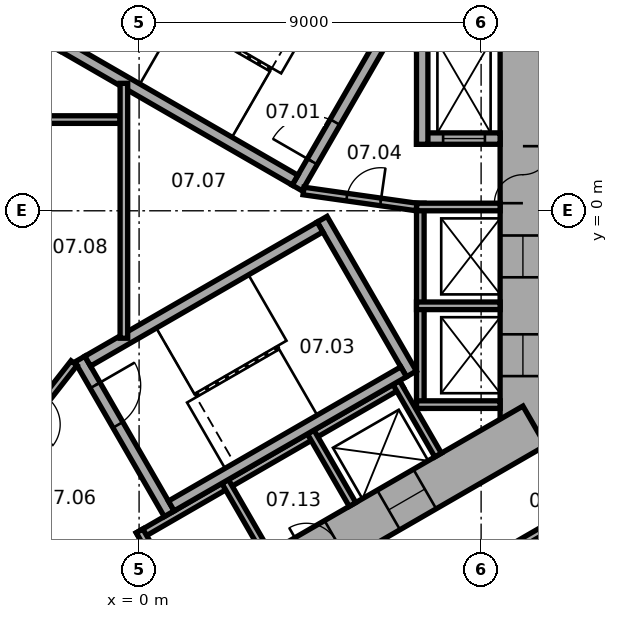
"""IFC4 building model, lengths in metres.
Left out: names, types, materials, properties, quantities, classifications, styles, units other than length and angle.
Written with IfcOpenShell. Run it as: python <this file> out.ifc"""

import sys

from ifc_helpers import new_model, si_unit, direction, frame, frame_2d, origin, place, context, subcontext, project, spatial, rectangle, extrude, element, fill, save


model = new_model("IFC4")
c1 = context("Model", 3, precision=1e-05, world=origin(), true_north=direction((0.0, 1.0)))
c2 = subcontext(c1, "Body", "Model", "MODEL_VIEW")
j1 = project(units=[si_unit("LENGTHUNIT", "METRE"), si_unit("PLANEANGLEUNIT", "RADIAN")], contexts=[c1])
p1 = place(None, origin())
s1 = spatial("IfcSite", under=j1, at=p1, CompositionType="ELEMENT")
p2 = place(p1, origin())
s2 = spatial("IfcBuilding", under=s1, at=p2, CompositionType="ELEMENT")
p3 = place(p2, frame((0.0, 0.0, 44.0)))
s3 = spatial("IfcBuildingStorey", under=s2, at=p3, CompositionType="ELEMENT", Elevation=44.0)
p4 = place(p3, frame((10.1, -6.177, 0.0), z_axis=(0.0, 0.0, 1.0), x_axis=(0.0, 1.0, 0.0)))
e1 = element("IfcWall", 1, at=p4, inside=s3, PredefinedType="SHEAR", context=c2, shape_type="SweptSolid", body=[
    extrude(rectangle(XDim=12.355, YDim=1.2, at=frame_2d((6.177, 0.0))), origin(), (0.0, 0.0, 1.0), 3.3),
])
p5 = place(p4, frame((6.378, 0.0, 0.0)))
e2 = element("IfcOpeningElement", 2, at=p5, cuts=e1, PredefinedType="OPENING", context=c2, shape_type="SweptSolid", body=[
    extrude(rectangle(XDim=1.5, YDim=2.1, at=frame_2d((0.75, 1.05))), frame((0.0, 0.61, 0.0), z_axis=(0.0, -1.0, 0.0), x_axis=(1.0, 0.0, 0.0)), (0.0, 0.0, 1.0), 1.22),
])
p6 = place(p4, frame((1.828, 0.0, 0.0)))
e3 = element("IfcOpeningElement", 3, at=p6, cuts=e1, PredefinedType="OPENING", context=c2, shape_type="SweptSolid", body=[
    extrude(rectangle(XDim=1.1, YDim=2.1, at=frame_2d((0.55, 1.05))), frame((0.0, 0.61, 0.0), z_axis=(0.0, -1.0, 0.0), x_axis=(1.0, 0.0, 0.0)), (0.0, 0.0, 1.0), 1.22),
])
p7 = place(p4, frame((4.427, 0.0, 0.0)))
e4 = element("IfcOpeningElement", 4, at=p7, cuts=e1, PredefinedType="OPENING", context=c2, shape_type="SweptSolid", body=[
    extrude(rectangle(XDim=1.1, YDim=2.1, at=frame_2d((0.55, 1.05))), frame((0.0, 0.61, 0.0), z_axis=(0.0, -1.0, 0.0), x_axis=(1.0, 0.0, 0.0)), (0.0, 0.0, 1.0), 1.22),
])
p8 = place(p3, frame((-10.4, -5.658, 0.0), z_axis=(0.0, 0.0, 1.0), x_axis=(0.866021384402, -0.500006961711, 0.0)))
e5 = element("IfcWall", 5, at=p8, inside=s3, PredefinedType="SHEAR", context=c2, shape_type="SweptSolid", body=[
    extrude(rectangle(XDim=12.355, YDim=1.2, at=frame_2d((6.178, 0.0))), origin(), (0.0, 0.0, 1.0), 3.3),
])
p9 = place(p8, frame((6.378, 0.0, 0.0)))
e6 = element("IfcOpeningElement", 6, at=p9, cuts=e5, PredefinedType="OPENING", context=c2, shape_type="SweptSolid", body=[
    extrude(rectangle(XDim=1.5, YDim=2.1, at=frame_2d((0.75, 1.05))), frame((0.0, 0.61, 0.0), z_axis=(0.0, -1.0, 0.0), x_axis=(1.0, 0.0, 0.0)), (0.0, 0.0, 1.0), 1.22),
])
p10 = place(p8, frame((3.228, 0.0, 0.0)))
e7 = element("IfcOpeningElement", 7, at=p10, cuts=e5, PredefinedType="OPENING", context=c2, shape_type="SweptSolid", body=[
    extrude(rectangle(XDim=0.9, YDim=2.1, at=frame_2d((0.45, 1.05))), frame((0.0, 0.61, 0.0), z_axis=(0.0, -1.0, 0.0), x_axis=(1.0, 0.0, 0.0)), (0.0, 0.0, 1.0), 1.22),
])
p11 = place(p3, frame((-0.3, -11.836, 0.0), z_axis=(0.0, 0.0, 1.0), x_axis=(0.866021384402, 0.500006961711, 0.0)))
e8 = element("IfcWall", 8, at=p11, inside=s3, PredefinedType="SHEAR", context=c2, shape_type="SweptSolid", body=[
    extrude(rectangle(XDim=12.355, YDim=1.2, at=frame_2d((6.178, 0.0))), origin(), (0.0, 0.0, 1.0), 3.3),
])
p12 = place(p11, frame((2.828, 0.0, 0.0)))
e9 = element("IfcOpeningElement", 9, at=p12, cuts=e8, PredefinedType="OPENING", context=c2, shape_type="SweptSolid", body=[
    extrude(rectangle(XDim=0.9, YDim=2.1, at=frame_2d((0.45, 1.05))), frame((0.0, 0.61, 0.0), z_axis=(0.0, -1.0, 0.0), x_axis=(1.0, 0.0, 0.0)), (0.0, 0.0, 1.0), 1.22),
])
p13 = place(p11, frame((5.428, 0.0, 0.0)))
e10 = element("IfcOpeningElement", 10, at=p13, cuts=e8, PredefinedType="OPENING", context=c2, shape_type="SweptSolid", body=[
    extrude(rectangle(XDim=0.9, YDim=2.1, at=frame_2d((0.45, 1.05))), frame((0.0, 0.61, 0.0), z_axis=(0.0, -1.0, 0.0), x_axis=(1.0, 0.0, 0.0)), (0.0, 0.0, 1.0), 1.22),
])
p14 = place(p11, frame((7.928, 0.0, 0.0)))
e11 = element("IfcOpeningElement", 11, at=p14, cuts=e8, PredefinedType="OPENING", context=c2, shape_type="SweptSolid", body=[
    extrude(rectangle(XDim=1.1, YDim=2.1, at=frame_2d((0.55, 1.05))), frame((0.0, 0.61, 0.0), z_axis=(0.0, -1.0, 0.0), x_axis=(1.0, 0.0, 0.0)), (0.0, 0.0, 1.0), 1.22),
])
p15 = place(p3, frame((7.4, -5.2, 0.0), z_axis=(0.0, 0.0, 1.0), x_axis=(0.0, 1.0, 0.0)))
e12 = element("IfcWall", 12, at=p15, inside=s3, PredefinedType="PARTITIONING", context=c2, shape_type="SweptSolid", body=[
    extrude(rectangle(XDim=5.4, YDim=0.2, at=frame_2d((2.7, 0.0))), origin(), (0.0, 0.0, 1.0), 3.05),
])
for number, where, z_axis, x_axis in (
    (13, (7.3, -5.1, 0.0), (0.0, 0.0, 1.0), (1.0, 0.0, 0.0)),
    (14, (7.3, -2.5, 0.0), (0.0, 0.0, 1.0), (1.0, 0.0, 0.0)),
    (15, (7.3, 0.1, 0.0), (0.0, 0.0, 1.0), (1.0, 0.0, 0.0)),
):
    element("IfcWall", number, at=place(p3, frame(where, z_axis=z_axis, x_axis=x_axis)), inside=s3, PredefinedType="PARTITIONING", context=c2, shape_type="SweptSolid", body=[
        extrude(rectangle(XDim=2.2, YDim=0.2, at=frame_2d((1.1, 0.0))), origin(), (0.0, 0.0, 1.0), 3.05),
    ])
p16 = place(p3, frame((7.424, 4.259, 0.0), z_axis=(0.0, 0.0, 1.0), x_axis=(-0.866026010844, 0.49999894854, 0.0)))
e16 = element("IfcWall", 16, at=p16, inside=s3, PredefinedType="PARTITIONING", context=c2, shape_type="SweptSolid", body=[
    extrude(rectangle(XDim=8.0, YDim=0.2, at=frame_2d((4.0, 0.0))), origin(), (0.0, 0.0, 1.0), 3.05),
])
p17 = place(p3, frame((7.287, 4.222, 0.0), z_axis=(0.0, 0.0, 1.0), x_axis=(0.499946605688, 0.86605622881, 0.0)))
e17 = element("IfcWall", 17, at=p17, inside=s3, PredefinedType="PARTITIONING", context=c2, shape_type="SweptSolid", body=[
    extrude(rectangle(XDim=2.2, YDim=0.2, at=frame_2d((1.1, 0.0))), origin(), (0.0, 0.0, 1.0), 3.05),
])
p18 = place(p3, frame((-0.024, -8.559, 0.0), z_axis=(0.0, 0.0, 1.0), x_axis=(0.866026010844, 0.49999894854, 0.0)))
e18 = element("IfcWall", 18, at=p18, inside=s3, PredefinedType="PARTITIONING", context=c2, shape_type="SweptSolid", body=[
    extrude(rectangle(XDim=8.0, YDim=0.2, at=frame_2d((4.0, 0.0))), origin(), (0.0, 0.0, 1.0), 3.05),
])
for number, where, z_axis, x_axis in (
    (19, (0.013, -8.422, 0.0), (0.0, 0.0, 1.0), (0.5, -0.866, 0.0)),
    (20, (2.264, -7.122, 0.0), (0.0, 0.0, 1.0), (0.5, -0.866, 0.0)),
    (21, (4.516, -5.822, 0.0), (0.0, 0.0, 1.0), (0.5, -0.866, 0.0)),
    (22, (6.768, -4.522, 0.0), (0.0, 0.0, 1.0), (0.5, -0.866, 0.0)),
):
    element("IfcWall", number, at=place(p3, frame(where, z_axis=z_axis, x_axis=x_axis)), inside=s3, PredefinedType="PARTITIONING", context=c2, shape_type="SweptSolid", body=[
        extrude(rectangle(XDim=2.2, YDim=0.2, at=frame_2d((1.1, 0.0))), origin(), (0.0, 0.0, 1.0), 3.05),
    ])
p19 = place(p3, frame((4.158, 0.602, 0.0), z_axis=(0.0, 0.0, 1.0), x_axis=(0.499977259774, 0.866038532462, 0.0)))
e23 = element("IfcWall", 23, at=p19, inside=s3, PredefinedType="SHEAR", context=c2, shape_type="SweptSolid", body=[
    extrude(rectangle(XDim=4.7, YDim=0.3, at=frame_2d((2.35, 0.0))), origin(), (0.0, 0.0, 1.0), 3.05),
])
p20 = place(p19, frame((0.8, 0.0, 0.0)))
e24 = element("IfcOpeningElement", 24, at=p20, cuts=e23, PredefinedType="OPENING", context=c2, shape_type="SweptSolid", body=[
    extrude(rectangle(XDim=1.2, YDim=2.1, at=frame_2d((0.6, 1.05))), frame((0.0, 0.16, 0.0), z_axis=(0.0, -1.0, 0.0), x_axis=(1.0, 0.0, 0.0)), (0.0, 0.0, 1.0), 0.32),
])
p21 = place(p3, frame((4.103, 0.807, 0.0), z_axis=(0.0, 0.0, 1.0), x_axis=(-0.866027801685, 0.499995846692, 0.0)))
e25 = element("IfcWall", 25, at=p21, inside=s3, PredefinedType="SHEAR", context=c2, shape_type="SweptSolid", body=[
    extrude(rectangle(XDim=7.06, YDim=0.3, at=frame_2d((3.53, 0.0))), origin(), (0.0, 0.0, 1.0), 3.05),
])
p22 = place(p3, frame((-1.558, -3.902, 0.0), z_axis=(0.0, 0.0, 1.0), x_axis=(0.499977259774, -0.866038532462, 0.0)))
e26 = element("IfcWall", 26, at=p22, inside=s3, PredefinedType="SHEAR", context=c2, shape_type="SweptSolid", body=[
    extrude(rectangle(XDim=4.7, YDim=0.3, at=frame_2d((2.35, 0.0))), origin(), (0.0, 0.0, 1.0), 3.05),
])
p23 = place(p22, frame((0.8, 0.0, 0.0)))
e27 = element("IfcOpeningElement", 27, at=p23, cuts=e26, PredefinedType="OPENING", context=c2, shape_type="SweptSolid", body=[
    extrude(rectangle(XDim=1.2, YDim=2.1, at=frame_2d((0.6, 1.05))), frame((0.0, 0.16, 0.0), z_axis=(0.0, -1.0, 0.0), x_axis=(1.0, 0.0, 0.0)), (0.0, 0.0, 1.0), 0.32),
])
p24 = place(p3, frame((4.816, -0.222, 0.0), z_axis=(0.0, 0.0, 1.0), x_axis=(0.499977259774, -0.866038532462, 0.0)))
e28 = element("IfcWall", 28, at=p24, inside=s3, PredefinedType="SHEAR", context=c2, shape_type="SweptSolid", body=[
    extrude(rectangle(XDim=4.7, YDim=0.3, at=frame_2d((2.35, 0.0))), origin(), (0.0, 0.0, 1.0), 3.05),
])
for number, where, z_axis, x_axis in (
    (29, (-1.353, -3.957, 0.0), (0.0, 0.0, 1.0), (0.866, 0.5, 0.0)),
    (30, (0.847, -7.767, 0.0), (0.0, 0.0, 1.0), (0.866, 0.5, 0.0)),
):
    element("IfcWall", number, at=place(p3, frame(where, z_axis=z_axis, x_axis=x_axis)), inside=s3, PredefinedType="SHEAR", context=c2, shape_type="SweptSolid", body=[
        extrude(rectangle(XDim=7.06, YDim=0.3, at=frame_2d((3.53, 0.0))), origin(), (0.0, 0.0, 1.0), 3.05),
    ])
p25 = place(p3, frame((7.3, 1.9, 0.0), z_axis=(0.0, 0.0, 1.0), x_axis=(1.0, 0.0, 0.0)))
e31 = element("IfcWall", 31, at=p25, inside=s3, PredefinedType="SHEAR", context=c2, shape_type="SweptSolid", body=[
    extrude(rectangle(XDim=2.2, YDim=0.3, at=frame_2d((1.1, 0.0))), origin(), (0.0, 0.0, 1.0), 3.05),
])
p26 = place(p25, frame((0.7, 0.0, 0.0)))
e32 = element("IfcOpeningElement", 32, at=p26, cuts=e31, PredefinedType="OPENING", context=c2, shape_type="SweptSolid", body=[
    extrude(rectangle(XDim=1.1, YDim=2.1, at=frame_2d((0.55, 1.05))), frame((0.0, 0.16, 0.0), z_axis=(0.0, -1.0, 0.0), x_axis=(1.0, 0.0, 0.0)), (0.0, 0.0, 1.0), 0.32),
])
p27 = place(p3, frame((7.45, 1.75, 0.0), z_axis=(0.0, 0.0, 1.0), x_axis=(0.0, 1.0, 0.0)))
e33 = element("IfcWall", 33, at=p27, inside=s3, PredefinedType="SHEAR", context=c2, shape_type="SweptSolid", body=[
    extrude(rectangle(XDim=3.35, YDim=0.3, at=frame_2d((1.675, 0.0))), origin(), (0.0, 0.0, 1.0), 3.05),
])
p28 = place(p3, frame((4.327, 0.521, 0.0), z_axis=(0.0, 0.0, 1.0), x_axis=(0.990124376366, -0.14019172346, 0.0)))
e34 = element("IfcWall", 34, at=p28, inside=s3, PredefinedType="PARTITIONING", context=c2, shape_type="SweptSolid", body=[
    extrude(rectangle(XDim=3.002, YDim=0.2, at=frame_2d((1.501, 0.0))), origin(), (0.0, 0.0, 1.0), 3.05),
])
p29 = place(p28, frame((1.15, 0.0, 0.0)))
e35 = element("IfcOpeningElement", 35, at=p29, cuts=e34, PredefinedType="OPENING", context=c2, shape_type="SweptSolid", body=[
    extrude(rectangle(XDim=0.9, YDim=2.1, at=frame_2d((0.45, 1.05))), frame((0.0, 0.11, 0.0), z_axis=(0.0, -1.0, 0.0), x_axis=(1.0, 0.0, 0.0)), (0.0, 0.0, 1.0), 0.22),
])
p30 = place(p3, frame((-1.712, -4.008, 0.0), z_axis=(0.0, 0.0, 1.0), x_axis=(-0.616549420702, -0.787316208287, 0.0)))
e36 = element("IfcWall", 36, at=p30, inside=s3, PredefinedType="PARTITIONING", context=c2, shape_type="SweptSolid", body=[
    extrude(rectangle(XDim=3.002, YDim=0.2, at=frame_2d((1.501, 0.0))), origin(), (0.0, 0.0, 1.0), 3.05),
])
p31 = place(p30, frame((1.15, 0.0, 0.0)))
e37 = element("IfcOpeningElement", 37, at=p31, cuts=e36, PredefinedType="OPENING", context=c2, shape_type="SweptSolid", body=[
    extrude(rectangle(XDim=0.9, YDim=2.1, at=frame_2d((0.45, 1.05))), frame((0.0, 0.11, 0.0), z_axis=(0.0, -1.0, 0.0), x_axis=(1.0, 0.0, 0.0)), (0.0, 0.0, 1.0), 0.22),
])
p32 = place(p3, frame((-2.72, 2.4, 0.0), z_axis=(0.0, 0.0, 1.0), x_axis=(1.0, 0.0, 0.0)))
e38 = element("IfcWall", 38, at=p32, inside=s3, PredefinedType="PARTITIONING", context=c2, shape_type="SweptSolid", body=[
    extrude(rectangle(XDim=2.22, YDim=0.2, at=frame_2d((1.11, 0.0))), origin(), (0.0, 0.0, 1.0), 3.05),
])
p33 = place(p3, frame((-0.4, -3.353, 0.0), z_axis=(0.0, 0.0, 1.0), x_axis=(0.0, 1.0, 0.0)))
e39 = element("IfcWall", 39, at=p33, inside=s3, PredefinedType="PARTITIONING", context=c2, shape_type="SweptSolid", body=[
    extrude(rectangle(XDim=6.707, YDim=0.2, at=frame_2d((3.353, 0.0))), origin(), (0.0, 0.0, 1.0), 3.05),
])
p34 = place(p3, frame((-11.615, -7.843, 0.0), z_axis=(0.0, 0.0, 1.0), x_axis=(0.866026466995, -0.499998158461, 0.0)))
e40 = element("IfcWall", 40, at=p34, inside=s3, PredefinedType="PARTITIONING", context=c2, shape_type="SweptSolid", body=[
    extrude(rectangle(XDim=12.315, YDim=0.2, at=frame_2d((6.158, 0.0))), origin(), (0.0, 0.0, 1.0), 3.05),
])
p35 = place(p34, frame((1.665, 0.0, 0.0)))
e41 = element("IfcOpeningElement", 41, at=p35, cuts=e40, PredefinedType="OPENING", context=c2, shape_type="SweptSolid", body=[
    extrude(rectangle(XDim=0.9, YDim=2.1, at=frame_2d((0.45, 1.05))), frame((0.0, 0.11, 0.0), z_axis=(0.0, -1.0, 0.0), x_axis=(1.0, 0.0, 0.0)), (0.0, 0.0, 1.0), 0.22),
])
p36 = place(p34, frame((9.787, 0.0, 0.0)))
e42 = element("IfcOpeningElement", 42, at=p36, cuts=e40, PredefinedType="OPENING", context=c2, shape_type="SweptSolid", body=[
    extrude(rectangle(XDim=0.9, YDim=2.1, at=frame_2d((0.45, 1.05))), frame((0.0, 0.11, 0.0), z_axis=(0.0, -1.0, 0.0), x_axis=(1.0, 0.0, 0.0)), (0.0, 0.0, 1.0), 0.22),
])
p37 = place(p3, frame((9.852, -8.861, 0.0), z_axis=(0.0, 0.0, 1.0), x_axis=(0.866013291437, 0.500020978615, 0.0)))
e43 = element("IfcWall", 43, at=p37, inside=s3, PredefinedType="PARTITIONING", context=c2, shape_type="SweptSolid", body=[
    extrude(rectangle(XDim=2.077, YDim=0.2, at=frame_2d((1.038, 0.0))), origin(), (0.0, 0.0, 1.0), 3.05),
])
p38 = place(p5, origin())
e44 = element("IfcDoor", 44, at=p38, inside=s3, OperationType="DOUBLE_DOOR_SINGLE_SWING", PredefinedType="DOOR", context=c2, shape_type="SweptSolid", body=[
    extrude(rectangle(XDim=1.5, YDim=2.1, at=frame_2d((0.75, 1.05))), frame((0.0, 0.025, 0.0), z_axis=(0.0, -1.0, 0.0), x_axis=(1.0, 0.0, 0.0)), (0.0, 0.0, 1.0), 0.05),
])
fill(e2, e44)
p39 = place(p20, origin())
e45 = element("IfcDoor", 45, at=p39, inside=s3, OperationType="SINGLE_SWING_RIGHT", PredefinedType="DOOR", context=c2, shape_type="SweptSolid", body=[
    extrude(rectangle(XDim=1.2, YDim=2.1, at=frame_2d((0.6, 1.05))), frame((0.0, 0.025, 0.0), z_axis=(0.0, -1.0, 0.0), x_axis=(1.0, 0.0, 0.0)), (0.0, 0.0, 1.0), 0.05),
])
fill(e24, e45)
p40 = place(p23, origin())
e46 = element("IfcDoor", 46, at=p40, inside=s3, OperationType="SINGLE_SWING_RIGHT", PredefinedType="DOOR", context=c2, shape_type="SweptSolid", body=[
    extrude(rectangle(XDim=1.2, YDim=2.1, at=frame_2d((0.6, 1.05))), frame((0.0, 0.025, 0.0), z_axis=(0.0, -1.0, 0.0), x_axis=(1.0, 0.0, 0.0)), (0.0, 0.0, 1.0), 0.05),
])
fill(e27, e46)
p41 = place(p29, origin())
e47 = element("IfcDoor", 47, at=p41, inside=s3, OperationType="SINGLE_SWING_LEFT", PredefinedType="DOOR", context=c2, shape_type="SweptSolid", body=[
    extrude(rectangle(XDim=0.9, YDim=2.1, at=frame_2d((0.45, 1.05))), frame((0.0, 0.025, 0.0), z_axis=(0.0, -1.0, 0.0), x_axis=(1.0, 0.0, 0.0)), (0.0, 0.0, 1.0), 0.05),
])
fill(e35, e47)
p42 = place(p26, origin())
e48 = element("IfcDoor", 48, at=p42, inside=s3, OperationType="DOUBLE_DOOR_SLIDING", PredefinedType="DOOR", context=c2, shape_type="SweptSolid", body=[
    extrude(rectangle(XDim=1.1, YDim=2.1, at=frame_2d((0.55, 1.05))), frame((0.0, 0.025, 0.0), z_axis=(0.0, -1.0, 0.0), x_axis=(1.0, 0.0, 0.0)), (0.0, 0.0, 1.0), 0.05),
])
fill(e32, e48)
p43 = place(p6, origin())
e49 = element("IfcDoor", 49, at=p43, inside=s3, OperationType="DOUBLE_DOOR_SLIDING", PredefinedType="DOOR", context=c2, shape_type="SweptSolid", body=[
    extrude(rectangle(XDim=1.1, YDim=2.1, at=frame_2d((0.55, 1.05))), frame((0.0, 0.025, 0.0), z_axis=(0.0, -1.0, 0.0), x_axis=(1.0, 0.0, 0.0)), (0.0, 0.0, 1.0), 0.05),
])
fill(e3, e49)
p44 = place(p7, origin())
e50 = element("IfcDoor", 50, at=p44, inside=s3, OperationType="DOUBLE_DOOR_SLIDING", PredefinedType="DOOR", context=c2, shape_type="SweptSolid", body=[
    extrude(rectangle(XDim=1.1, YDim=2.1, at=frame_2d((0.55, 1.05))), frame((0.0, 0.025, 0.0), z_axis=(0.0, -1.0, 0.0), x_axis=(1.0, 0.0, 0.0)), (0.0, 0.0, 1.0), 0.05),
])
fill(e4, e50)
p45 = place(p14, origin())
e51 = element("IfcDoor", 51, at=p45, inside=s3, OperationType="DOUBLE_DOOR_SLIDING", PredefinedType="DOOR", context=c2, shape_type="SweptSolid", body=[
    extrude(rectangle(XDim=1.1, YDim=2.1, at=frame_2d((0.55, 1.05))), frame((0.0, 0.025, 0.0), z_axis=(0.0, -1.0, 0.0), x_axis=(1.0, 0.0, 0.0)), (0.0, 0.0, 1.0), 0.05),
])
fill(e11, e51)
save(model, sys.argv[1])
